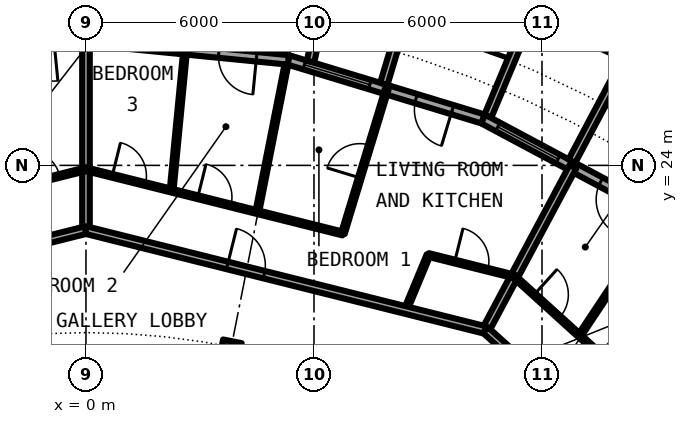
"""IFC4 building model, lengths in metres.
Left out: names, types, materials, properties, quantities, classifications, styles, units other than length and angle.
Written with IfcOpenShell. Run it as: python <this file> out.ifc"""

import sys

from ifc_helpers import new_model, si_unit, direction, frame, frame_2d, origin, origin_2d, place, context, subcontext, project, spatial, rectangle, circle, i_section, extrude, element, fill, save


model = new_model("IFC4")
c1 = context("Model", 3, precision=1e-05, world=origin(), true_north=direction((0.0, 1.0)))
c2 = subcontext(c1, "Body", "Model", "MODEL_VIEW")
j1 = project(units=[si_unit("LENGTHUNIT", "METRE"), si_unit("PLANEANGLEUNIT", "RADIAN")], contexts=[c1])
p1 = place(None, origin())
s1 = spatial("IfcSite", under=j1, at=p1, CompositionType="ELEMENT")
p2 = place(p1, origin())
s2 = spatial("IfcBuilding", under=s1, at=p2, CompositionType="ELEMENT")
p3 = place(p2, frame((0.0, 0.0, 154.35)))
s3 = spatial("IfcBuildingStorey", under=s2, at=p3, CompositionType="ELEMENT", Elevation=154.35)
p4 = place(p3, frame((3.824, 19.223, 0.0), z_axis=(0.0, 0.0, 1.0), x_axis=(0.195090322016, 0.980785280403, 0.0)))
e1 = element("IfcColumn", 1, at=p4, inside=s3, PredefinedType="COLUMN", context=c2, shape_type="SweptSolid", body=[
    extrude(i_section(OverallWidth=0.3, OverallDepth=0.5, WebThickness=0.014, FlangeThickness=0.028, FilletRadius=0.027, at=origin_2d()), origin(), (0.0, 0.0, 1.0), 3.05),
])
p5 = place(p3, frame((15.167, 22.699, 0.0), z_axis=(0.0, 0.0, 1.0), x_axis=(-0.881915646801, 0.471407246368, 0.0)))
e2 = element("IfcWall", 2, at=p5, inside=s3, PredefinedType="SOLIDWALL", context=c2, shape_type="SweptSolid", body=[
    extrude(rectangle(XDim=5.352, YDim=0.25, at=frame_2d((2.676, 0.0))), origin(), (0.0, 0.0, 1.0), 2.7),
])
p6 = place(p5, frame((0.841, 0.0, 0.0)))
e3 = element("IfcOpeningElement", 3, at=p6, cuts=e2, PredefinedType="OPENING", context=c2, shape_type="SweptSolid", body=[
    extrude(rectangle(XDim=1.0, YDim=2.2, at=frame_2d((0.5, 1.1))), frame((0.0, 0.135, 0.0), z_axis=(0.0, -1.0, 0.0), x_axis=(1.0, 0.0, 0.0)), (0.0, 0.0, 1.0), 0.27),
])
p7 = place(p5, frame((3.111, 0.0, 0.3)))
e4 = element("IfcOpeningElement", 4, at=p7, cuts=e2, PredefinedType="OPENING", context=c2, shape_type="SweptSolid", body=[
    extrude(rectangle(XDim=1.8, YDim=2.1, at=frame_2d((0.9, 1.05))), frame((0.0, 0.135, 0.0), z_axis=(0.0, -1.0, 0.0), x_axis=(1.0, 0.0, 0.0)), (0.0, 0.0, 1.0), 0.27),
])
p8 = place(p3, frame((14.335, 26.808, -0.03), z_axis=(0.0, 0.0, 1.0), x_axis=(-0.904000060331, 0.427532327342, 0.0)))
e5 = element("IfcWall", 5, at=p8, inside=s3, PredefinedType="SOLIDWALL", context=c2, shape_type="SweptSolid", body=[
    extrude(rectangle(XDim=2.993, YDim=0.2, at=frame_2d((1.497, 0.0))), origin(), (0.0, 0.0, 1.0), 2.73),
])
p9 = place(p8, frame((0.457, 0.0, 0.33)))
e6 = element("IfcOpeningElement", 6, at=p9, cuts=e5, PredefinedType="OPENING", context=c2, shape_type="SweptSolid", body=[
    extrude(circle(Radius=1.04, at=frame_2d((1.04, 1.04))), frame((0.0, 0.11, 0.0), z_axis=(0.0, -1.0, 0.0), x_axis=(1.0, 0.0, 0.0)), (0.0, 0.0, 1.0), 0.22),
])
p10 = place(p3, frame((12.787, 24.113, -0.03), z_axis=(0.0, 0.0, 1.0), x_axis=(0.468365282436, 0.883534924159, 0.0)))
e7 = element("IfcWall", 7, at=p10, inside=s3, PredefinedType="SOLIDWALL", context=c2, shape_type="SweptSolid", body=[
    extrude(rectangle(XDim=3.006, YDim=0.2, at=frame_2d((1.503, 0.0))), origin(), (0.0, 0.0, 1.0), 2.73),
])
p11 = place(p3, frame((10.575, 25.295, -0.03), z_axis=(0.0, 0.0, 1.0), x_axis=(0.385697364644, 0.922625353492, 0.0)))
e8 = element("IfcWall", 8, at=p11, inside=s3, PredefinedType="SOLIDWALL", context=c2, shape_type="SweptSolid", body=[
    extrude(rectangle(XDim=2.883, YDim=0.2, at=frame_2d((1.442, 0.0))), origin(), (0.0, 0.0, 1.0), 2.73),
])
p12 = place(p3, frame((10.447, 25.222, 0.0), z_axis=(0.0, 0.0, 1.0), x_axis=(-0.956965678721, 0.290201119486, 0.0)))
e9 = element("IfcWall", 9, at=p12, inside=s3, PredefinedType="SOLIDWALL", context=c2, shape_type="SweptSolid", body=[
    extrude(rectangle(XDim=5.351, YDim=0.25, at=frame_2d((2.676, 0.0))), origin(), (0.0, 0.0, 1.0), 2.7),
])
p13 = place(p12, frame((0.841, 0.0, 0.0)))
e10 = element("IfcOpeningElement", 10, at=p13, cuts=e9, PredefinedType="OPENING", context=c2, shape_type="SweptSolid", body=[
    extrude(rectangle(XDim=1.0, YDim=2.2, at=frame_2d((0.5, 1.1))), frame((0.0, 0.135, 0.0), z_axis=(0.0, -1.0, 0.0), x_axis=(1.0, 0.0, 0.0)), (0.0, 0.0, 1.0), 0.27),
])
p14 = place(p12, frame((3.111, 0.0, 0.3)))
e11 = element("IfcOpeningElement", 11, at=p14, cuts=e9, PredefinedType="OPENING", context=c2, shape_type="SweptSolid", body=[
    extrude(rectangle(XDim=1.8, YDim=2.1, at=frame_2d((0.9, 1.05))), frame((0.0, 0.135, 0.0), z_axis=(0.0, -1.0, 0.0), x_axis=(1.0, 0.0, 0.0)), (0.0, 0.0, 1.0), 0.27),
])
p15 = place(p3, frame((7.837, 26.144, -0.03), z_axis=(0.0, 0.0, 1.0), x_axis=(0.287064767992, 0.957911174889, 0.0)))
e12 = element("IfcWall", 12, at=p15, inside=s3, PredefinedType="SOLIDWALL", context=c2, shape_type="SweptSolid", body=[
    extrude(rectangle(XDim=3.006, YDim=0.2, at=frame_2d((1.503, 0.0))), origin(), (0.0, 0.0, 1.0), 2.73),
])
p16 = place(p3, frame((5.909, 26.729, -0.03), z_axis=(0.0, 0.0, 1.0), x_axis=(0.216409053917, 0.976302781612, 0.0)))
e13 = element("IfcWall", 13, at=p16, inside=s3, PredefinedType="SOLIDWALL", context=c2, shape_type="SweptSolid", body=[
    extrude(rectangle(XDim=2.925, YDim=0.2, at=frame_2d((1.463, 0.0))), origin(), (0.0, 0.0, 1.0), 2.73),
])
p17 = place(p3, frame((5.326, 26.775, 0.0), z_axis=(0.0, 0.0, 1.0), x_axis=(-0.995173996315, 0.098126026407, 0.0)))
e14 = element("IfcWall", 14, at=p17, inside=s3, PredefinedType="SOLIDWALL", context=c2, shape_type="SweptSolid", body=[
    extrude(rectangle(XDim=5.352, YDim=0.25, at=frame_2d((2.676, 0.0))), origin(), (0.0, 0.0, 1.0), 2.7),
])
p18 = place(p17, frame((0.841, 0.0, 0.0)))
e15 = element("IfcOpeningElement", 15, at=p18, cuts=e14, PredefinedType="OPENING", context=c2, shape_type="SweptSolid", body=[
    extrude(rectangle(XDim=1.0, YDim=2.2, at=frame_2d((0.5, 1.1))), frame((0.0, 0.135, 0.0), z_axis=(0.0, -1.0, 0.0), x_axis=(1.0, 0.0, 0.0)), (0.0, 0.0, 1.0), 0.27),
])
p19 = place(p17, frame((3.111, 0.0, 0.3)))
e16 = element("IfcOpeningElement", 16, at=p19, cuts=e14, PredefinedType="OPENING", context=c2, shape_type="SweptSolid", body=[
    extrude(rectangle(XDim=1.8, YDim=2.1, at=frame_2d((0.9, 1.05))), frame((0.0, 0.135, 0.0), z_axis=(0.0, -1.0, 0.0), x_axis=(1.0, 0.0, 0.0)), (0.0, 0.0, 1.0), 0.27),
])
p20 = place(p3, frame((0.0, 27.3, 0.0), z_axis=(0.0, 0.0, 1.0), x_axis=(-0.995173996315, -0.098126026407, 0.0)))
e17 = element("IfcWall", 17, at=p20, inside=s3, PredefinedType="SOLIDWALL", context=c2, shape_type="SweptSolid", body=[
    extrude(rectangle(XDim=5.352, YDim=0.25, at=frame_2d((2.676, 0.0))), origin(), (0.0, 0.0, 1.0), 2.7),
])
p21 = place(p20, frame((0.841, 0.0, 0.0)))
e18 = element("IfcOpeningElement", 18, at=p21, cuts=e17, PredefinedType="OPENING", context=c2, shape_type="SweptSolid", body=[
    extrude(rectangle(XDim=1.0, YDim=2.2, at=frame_2d((0.5, 1.1))), frame((0.0, 0.135, 0.0), z_axis=(0.0, -1.0, 0.0), x_axis=(1.0, 0.0, 0.0)), (0.0, 0.0, 1.0), 0.27),
])
p22 = place(p20, frame((3.111, 0.0, 0.3)))
e19 = element("IfcOpeningElement", 19, at=p22, cuts=e17, PredefinedType="OPENING", context=c2, shape_type="SweptSolid", body=[
    extrude(rectangle(XDim=1.8, YDim=2.1, at=frame_2d((0.9, 1.05))), frame((0.0, 0.135, 0.0), z_axis=(0.0, -1.0, 0.0), x_axis=(1.0, 0.0, 0.0)), (0.0, 0.0, 1.0), 0.27),
])
p23 = place(p3, frame((8.41, 20.193, 0.0), z_axis=(0.0, 0.0, 1.0), x_axis=(0.384228756538, 0.923237923099, 0.0)))
e20 = element("IfcWall", 20, at=p23, inside=s3, PredefinedType="PARTITIONING", context=c2, shape_type="SweptSolid", body=[
    extrude(rectangle(XDim=1.569, YDim=0.1, at=frame_2d((0.785, 0.0))), origin(), (0.0, 0.0, 1.0), 2.7),
])
p24 = place(p3, frame((0.0, 22.3, 0.0), z_axis=(0.0, 0.0, 1.0), x_axis=(0.0, 1.0, 0.0)))
e21 = element("IfcWall", 21, at=p24, inside=s3, PredefinedType="PARTITIONING", context=c2, shape_type="SweptSolid", body=[
    extrude(rectangle(XDim=4.875, YDim=0.2, at=frame_2d((2.438, 0.0))), origin(), (0.0, 0.0, 1.0), 2.7),
])
p25 = place(p3, frame((2.253, 23.336, 0.0), z_axis=(0.0, 0.0, 1.0), x_axis=(0.09626981452, 0.995355274669, 0.0)))
e22 = element("IfcWall", 22, at=p25, inside=s3, PredefinedType="PARTITIONING", context=c2, shape_type="SweptSolid", body=[
    extrude(rectangle(XDim=3.73, YDim=0.1, at=frame_2d((1.865, 0.0))), origin(), (0.0, 0.0, 1.0), 2.7),
])
p26 = place(p3, frame((4.507, 22.771, 0.0), z_axis=(0.0, 0.0, 1.0), x_axis=(0.194030211642, 0.980995554001, 0.0)))
e23 = element("IfcWall", 23, at=p26, inside=s3, PredefinedType="PARTITIONING", context=c2, shape_type="SweptSolid", body=[
    extrude(rectangle(XDim=3.962, YDim=0.1, at=frame_2d((1.981, 0.0))), origin(), (0.0, 0.0, 1.0), 2.7),
])
p27 = place(p3, frame((6.76, 22.207, 0.0), z_axis=(0.0, 0.0, 1.0), x_axis=(0.291291575636, 0.956634317785, 0.0)))
e24 = element("IfcWall", 24, at=p27, inside=s3, PredefinedType="PARTITIONING", context=c2, shape_type="SweptSolid", body=[
    extrude(rectangle(XDim=3.962, YDim=0.1, at=frame_2d((1.981, 0.0))), origin(), (0.0, 0.0, 1.0), 2.7),
])
p28 = place(p27, frame((1.531, 0.0, 0.0)))
e25 = element("IfcOpeningElement", 25, at=p28, cuts=e24, PredefinedType="OPENING", context=c2, shape_type="SweptSolid", body=[
    extrude(rectangle(XDim=0.9, YDim=2.3, at=frame_2d((0.45, 1.15))), frame((0.0, 0.06, 0.0), z_axis=(0.0, -1.0, 0.0), x_axis=(1.0, 0.0, 0.0)), (0.0, 0.0, 1.0), 0.12),
])
p29 = place(p3, frame((10.516, 19.665, 0.0), z_axis=(0.0, 0.0, 1.0), x_axis=(0.471388689095, 0.881925565903, 0.0)))
e26 = element("IfcWall", 26, at=p29, inside=s3, PredefinedType="PARTITIONING", context=c2, shape_type="SweptSolid", body=[
    extrude(rectangle(XDim=4.875, YDim=0.2, at=frame_2d((2.438, 0.0))), origin(), (0.0, 0.0, 1.0), 2.7),
])
p30 = place(p3, frame((12.988, 19.518, 0.0), z_axis=(0.0, 0.0, 1.0), x_axis=(0.553823887887, 0.83263383381, 0.0)))
e27 = element("IfcWall", 27, at=p30, inside=s3, PredefinedType="PARTITIONING", context=c2, shape_type="SweptSolid", body=[
    extrude(rectangle(XDim=3.73, YDim=0.1, at=frame_2d((1.865, 0.0))), origin(), (0.0, 0.0, 1.0), 2.7),
])
p31 = place(p3, frame((-10.512, 19.667, 0.0), z_axis=(0.0, 0.0, 1.0), x_axis=(0.970086843848, 0.242758141765, 0.0)))
e28 = element("IfcWall", 28, at=p31, inside=s3, PredefinedType="PARTITIONING", context=c2, shape_type="SweptSolid", body=[
    extrude(rectangle(XDim=10.842, YDim=0.2, at=frame_2d((5.421, 0.0))), origin(), (0.0, 0.0, 1.0), 2.7),
])
p32 = place(p31, frame((6.002, 0.0, 0.0)))
e29 = element("IfcOpeningElement", 29, at=p32, cuts=e28, PredefinedType="OPENING", context=c2, shape_type="SweptSolid", body=[
    extrude(rectangle(XDim=1.0, YDim=2.3, at=frame_2d((0.5, 1.15))), frame((0.0, 0.11, 0.0), z_axis=(0.0, -1.0, 0.0), x_axis=(1.0, 0.0, 0.0)), (0.0, 0.0, 1.0), 0.22),
])
p33 = place(p3, frame((-0.006, 22.299, 0.0), z_axis=(0.0, 0.0, 1.0), x_axis=(0.970086843848, -0.242758141765, 0.0)))
e30 = element("IfcWall", 30, at=p33, inside=s3, PredefinedType="PARTITIONING", context=c2, shape_type="SweptSolid", body=[
    extrude(rectangle(XDim=10.842, YDim=0.2, at=frame_2d((5.421, 0.0))), origin(), (0.0, 0.0, 1.0), 2.7),
])
p34 = place(p33, frame((3.841, 0.0, 0.0)))
e31 = element("IfcOpeningElement", 31, at=p34, cuts=e30, PredefinedType="OPENING", context=c2, shape_type="SweptSolid", body=[
    extrude(rectangle(XDim=1.0, YDim=2.3, at=frame_2d((0.5, 1.15))), frame((0.0, 0.11, 0.0), z_axis=(0.0, -1.0, 0.0), x_axis=(1.0, 0.0, 0.0)), (0.0, 0.0, 1.0), 0.22),
])
p35 = place(p3, frame((10.512, 19.667, 0.0), z_axis=(0.0, 0.0, 1.0), x_axis=(0.740947367223, -0.671563101283, 0.0)))
e32 = element("IfcWall", 32, at=p35, inside=s3, PredefinedType="PARTITIONING", context=c2, shape_type="SweptSolid", body=[
    extrude(rectangle(XDim=10.837, YDim=0.2, at=frame_2d((5.419, 0.0))), origin(), (0.0, 0.0, 1.0), 2.7),
])
p36 = place(p35, frame((3.835, 0.0, 0.0)))
e33 = element("IfcOpeningElement", 33, at=p36, cuts=e32, PredefinedType="OPENING", context=c2, shape_type="SweptSolid", body=[
    extrude(rectangle(XDim=1.0, YDim=2.3, at=frame_2d((0.5, 1.15))), frame((0.0, 0.11, 0.0), z_axis=(0.0, -1.0, 0.0), x_axis=(1.0, 0.0, 0.0)), (0.0, 0.0, 1.0), 0.22),
])
p37 = place(p3, frame((-6.76, 22.206, 0.0), z_axis=(0.0, 0.0, 1.0), x_axis=(0.970070358667, 0.242824008772, 0.0)))
e34 = element("IfcWall", 34, at=p37, inside=s3, PredefinedType="PARTITIONING", context=c2, shape_type="SweptSolid", body=[
    extrude(rectangle(XDim=6.972, YDim=0.1, at=frame_2d((3.486, 0.0))), origin(), (0.0, 0.0, 1.0), 2.7),
])
p38 = place(p37, frame((3.037, 0.0, 0.0)))
e35 = element("IfcOpeningElement", 35, at=p38, cuts=e34, PredefinedType="OPENING", context=c2, shape_type="SweptSolid", body=[
    extrude(rectangle(XDim=0.9, YDim=2.3, at=frame_2d((0.45, 1.15))), frame((0.0, 0.06, 0.0), z_axis=(0.0, -1.0, 0.0), x_axis=(1.0, 0.0, 0.0)), (0.0, 0.0, 1.0), 0.12),
])
p39 = place(p37, frame((5.357, 0.0, 0.0)))
e36 = element("IfcOpeningElement", 36, at=p39, cuts=e34, PredefinedType="OPENING", context=c2, shape_type="SweptSolid", body=[
    extrude(rectangle(XDim=0.9, YDim=2.3, at=frame_2d((0.45, 1.15))), frame((0.0, 0.06, 0.0), z_axis=(0.0, -1.0, 0.0), x_axis=(1.0, 0.0, 0.0)), (0.0, 0.0, 1.0), 0.12),
])
p40 = place(p3, frame((-0.003, 23.899, 0.0), z_axis=(0.0, 0.0, 1.0), x_axis=(0.970070358667, -0.242824008772, 0.0)))
e37 = element("IfcWall", 37, at=p40, inside=s3, PredefinedType="PARTITIONING", context=c2, shape_type="SweptSolid", body=[
    extrude(rectangle(XDim=6.972, YDim=0.1, at=frame_2d((3.486, 0.0))), origin(), (0.0, 0.0, 1.0), 2.7),
])
p41 = place(p40, frame((3.035, 0.0, 0.0)))
e38 = element("IfcOpeningElement", 38, at=p41, cuts=e37, PredefinedType="OPENING", context=c2, shape_type="SweptSolid", body=[
    extrude(rectangle(XDim=0.9, YDim=2.3, at=frame_2d((0.45, 1.15))), frame((0.0, 0.06, 0.0), z_axis=(0.0, -1.0, 0.0), x_axis=(1.0, 0.0, 0.0)), (0.0, 0.0, 1.0), 0.12),
])
p42 = place(p40, frame((0.715, 0.0, 0.0)))
e39 = element("IfcOpeningElement", 39, at=p42, cuts=e37, PredefinedType="OPENING", context=c2, shape_type="SweptSolid", body=[
    extrude(rectangle(XDim=0.9, YDim=2.3, at=frame_2d((0.45, 1.15))), frame((0.0, 0.06, 0.0), z_axis=(0.0, -1.0, 0.0), x_axis=(1.0, 0.0, 0.0)), (0.0, 0.0, 1.0), 0.12),
])
p43 = place(p3, frame((9.013, 21.642, 0.0), z_axis=(0.0, 0.0, 1.0), x_axis=(0.970049686104, -0.242906579758, 0.0)))
e40 = element("IfcWall", 40, at=p43, inside=s3, PredefinedType="PARTITIONING", context=c2, shape_type="SweptSolid", body=[
    extrude(rectangle(XDim=2.323, YDim=0.1, at=frame_2d((1.161, 0.0))), origin(), (0.0, 0.0, 1.0), 2.7),
])
p44 = place(p43, frame((0.711, 0.0, 0.0)))
e41 = element("IfcOpeningElement", 41, at=p44, cuts=e40, PredefinedType="OPENING", context=c2, shape_type="SweptSolid", body=[
    extrude(rectangle(XDim=0.9, YDim=2.3, at=frame_2d((0.45, 1.15))), frame((0.0, 0.06, 0.0), z_axis=(0.0, -1.0, 0.0), x_axis=(1.0, 0.0, 0.0)), (0.0, 0.0, 1.0), 0.12),
])
p45 = place(p3, frame((11.266, 21.078, 0.0), z_axis=(0.0, 0.0, 1.0), x_axis=(0.74097115376, -0.671536856245, 0.0)))
e42 = element("IfcWall", 42, at=p45, inside=s3, PredefinedType="PARTITIONING", context=c2, shape_type="SweptSolid", body=[
    extrude(rectangle(XDim=6.969, YDim=0.1, at=frame_2d((3.484, 0.0))), origin(), (0.0, 0.0, 1.0), 2.7),
])
p46 = place(p45, frame((3.034, 0.0, 0.0)))
e43 = element("IfcOpeningElement", 43, at=p46, cuts=e42, PredefinedType="OPENING", context=c2, shape_type="SweptSolid", body=[
    extrude(rectangle(XDim=0.9, YDim=2.3, at=frame_2d((0.45, 1.15))), frame((0.0, 0.06, 0.0), z_axis=(0.0, -1.0, 0.0), x_axis=(1.0, 0.0, 0.0)), (0.0, 0.0, 1.0), 0.12),
])
p47 = place(p45, frame((0.712, 0.0, 0.0)))
e44 = element("IfcOpeningElement", 44, at=p47, cuts=e42, PredefinedType="OPENING", context=c2, shape_type="SweptSolid", body=[
    extrude(rectangle(XDim=0.9, YDim=2.3, at=frame_2d((0.45, 1.15))), frame((0.0, 0.06, 0.0), z_axis=(0.0, -1.0, 0.0), x_axis=(1.0, 0.0, 0.0)), (0.0, 0.0, 1.0), 0.12),
])
p48 = place(p6, origin())
e45 = element("IfcDoor", 45, at=p48, inside=s3, OperationType="SINGLE_SWING_LEFT", PredefinedType="DOOR", context=c2, shape_type="SweptSolid", body=[
    extrude(rectangle(XDim=1.0, YDim=2.2, at=frame_2d((0.5, 1.1))), frame((0.0, 0.025, 0.0), z_axis=(0.0, -1.0, 0.0), x_axis=(1.0, 0.0, 0.0)), (0.0, 0.0, 1.0), 0.05),
])
fill(e3, e45)
p49 = place(p7, origin())
e46 = element("IfcWindow", 46, at=p49, inside=s3, PartitioningType="SINGLE_PANEL", PredefinedType="WINDOW", context=c2, shape_type="SweptSolid", body=[
    extrude(rectangle(XDim=1.8, YDim=2.1, at=frame_2d((0.9, 1.05))), frame((0.0, 0.03, 0.0), z_axis=(0.0, -1.0, 0.0), x_axis=(1.0, 0.0, 0.0)), (0.0, 0.0, 1.0), 0.06),
])
fill(e4, e46)
p50 = place(p9, origin())
e47 = element("IfcWindow", 47, at=p50, inside=s3, PartitioningType="SINGLE_PANEL", PredefinedType="WINDOW", context=c2, shape_type="SweptSolid", body=[
    extrude(circle(Radius=1.04, at=frame_2d((1.04, 1.04))), frame((0.0, 0.03, 0.0), z_axis=(0.0, -1.0, 0.0), x_axis=(1.0, 0.0, 0.0)), (0.0, 0.0, 1.0), 0.06),
])
fill(e6, e47)
p51 = place(p13, origin())
e48 = element("IfcDoor", 48, at=p51, inside=s3, OperationType="SINGLE_SWING_LEFT", PredefinedType="DOOR", context=c2, shape_type="SweptSolid", body=[
    extrude(rectangle(XDim=1.0, YDim=2.2, at=frame_2d((0.5, 1.1))), frame((0.0, 0.025, 0.0), z_axis=(0.0, -1.0, 0.0), x_axis=(1.0, 0.0, 0.0)), (0.0, 0.0, 1.0), 0.05),
])
fill(e10, e48)
p52 = place(p14, origin())
e49 = element("IfcWindow", 49, at=p52, inside=s3, PartitioningType="SINGLE_PANEL", PredefinedType="WINDOW", context=c2, shape_type="SweptSolid", body=[
    extrude(rectangle(XDim=1.8, YDim=2.1, at=frame_2d((0.9, 1.05))), frame((0.0, 0.03, 0.0), z_axis=(0.0, -1.0, 0.0), x_axis=(1.0, 0.0, 0.0)), (0.0, 0.0, 1.0), 0.06),
])
fill(e11, e49)
p53 = place(p18, origin())
e50 = element("IfcDoor", 50, at=p53, inside=s3, OperationType="SINGLE_SWING_LEFT", PredefinedType="DOOR", context=c2, shape_type="SweptSolid", body=[
    extrude(rectangle(XDim=1.0, YDim=2.2, at=frame_2d((0.5, 1.1))), frame((0.0, 0.025, 0.0), z_axis=(0.0, -1.0, 0.0), x_axis=(1.0, 0.0, 0.0)), (0.0, 0.0, 1.0), 0.05),
])
fill(e15, e50)
p54 = place(p47, origin())
e51 = element("IfcDoor", 51, at=p54, inside=s3, OperationType="SINGLE_SWING_LEFT", PredefinedType="DOOR", context=c2, shape_type="SweptSolid", body=[
    extrude(rectangle(XDim=0.9, YDim=2.3, at=frame_2d((0.45, 1.15))), frame((0.0, 0.025, 0.0), z_axis=(0.0, -1.0, 0.0), x_axis=(1.0, 0.0, 0.0)), (0.0, 0.0, 1.0), 0.05),
])
fill(e44, e51)
p55 = place(p34, origin())
e52 = element("IfcDoor", 52, at=p55, inside=s3, OperationType="SINGLE_SWING_LEFT", PredefinedType="DOOR", context=c2, shape_type="SweptSolid", body=[
    extrude(rectangle(XDim=1.0, YDim=2.3, at=frame_2d((0.5, 1.15))), frame((0.0, 0.025, 0.0), z_axis=(0.0, -1.0, 0.0), x_axis=(1.0, 0.0, 0.0)), (0.0, 0.0, 1.0), 0.05),
])
fill(e31, e52)
p56 = place(p44, origin())
e53 = element("IfcDoor", 53, at=p56, inside=s3, OperationType="SINGLE_SWING_RIGHT", PredefinedType="DOOR", context=c2, shape_type="SweptSolid", body=[
    extrude(rectangle(XDim=0.9, YDim=2.3, at=frame_2d((0.45, 1.15))), frame((0.0, 0.025, 0.0), z_axis=(0.0, -1.0, 0.0), x_axis=(1.0, 0.0, 0.0)), (0.0, 0.0, 1.0), 0.05),
])
fill(e41, e53)
p57 = place(p28, origin())
e54 = element("IfcDoor", 54, at=p57, inside=s3, OperationType="SINGLE_SWING_RIGHT", PredefinedType="DOOR", context=c2, shape_type="SweptSolid", body=[
    extrude(rectangle(XDim=0.9, YDim=2.3, at=frame_2d((0.45, 1.15))), frame((0.0, 0.025, 0.0), z_axis=(0.0, -1.0, 0.0), x_axis=(1.0, 0.0, 0.0)), (0.0, 0.0, 1.0), 0.05),
])
fill(e25, e54)
p58 = place(p41, origin())
e55 = element("IfcDoor", 55, at=p58, inside=s3, OperationType="SINGLE_SWING_LEFT", PredefinedType="DOOR", context=c2, shape_type="SweptSolid", body=[
    extrude(rectangle(XDim=0.9, YDim=2.3, at=frame_2d((0.45, 1.15))), frame((0.0, 0.025, 0.0), z_axis=(0.0, -1.0, 0.0), x_axis=(1.0, 0.0, 0.0)), (0.0, 0.0, 1.0), 0.05),
])
fill(e38, e55)
p59 = place(p42, origin())
e56 = element("IfcDoor", 56, at=p59, inside=s3, OperationType="SINGLE_SWING_LEFT", PredefinedType="DOOR", context=c2, shape_type="SweptSolid", body=[
    extrude(rectangle(XDim=0.9, YDim=2.3, at=frame_2d((0.45, 1.15))), frame((0.0, 0.025, 0.0), z_axis=(0.0, -1.0, 0.0), x_axis=(1.0, 0.0, 0.0)), (0.0, 0.0, 1.0), 0.05),
])
fill(e39, e56)
p60 = place(p39, origin())
e57 = element("IfcDoor", 57, at=p60, inside=s3, OperationType="SINGLE_SWING_RIGHT", PredefinedType="DOOR", context=c2, shape_type="SweptSolid", body=[
    extrude(rectangle(XDim=0.9, YDim=2.3, at=frame_2d((0.45, 1.15))), frame((0.0, 0.025, 0.0), z_axis=(0.0, -1.0, 0.0), x_axis=(1.0, 0.0, 0.0)), (0.0, 0.0, 1.0), 0.05),
])
fill(e36, e57)
save(model, sys.argv[1])
